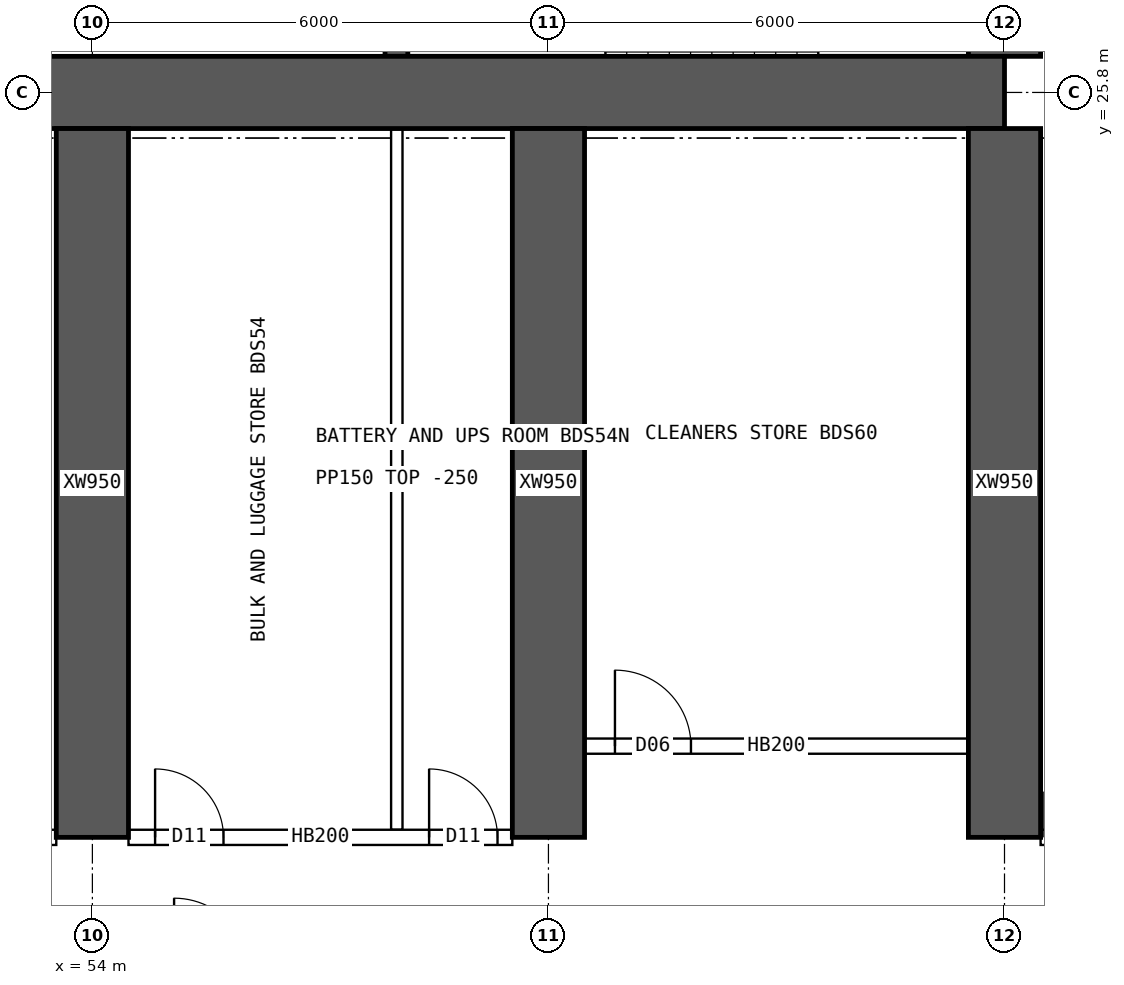
"""IFC4 building model, lengths in metres.
Left out: names, types, materials, properties, quantities, classifications, styles, units other than length and angle.
Written with IfcOpenShell. Run it as: python <this file> out.ifc"""

import sys

from ifc_helpers import new_model, si_unit, direction, frame, frame_2d, origin, place, context, subcontext, project, spatial, rectangle, extrude, element, fill, save


model = new_model("IFC4")
c1 = context("Model", 3, precision=1e-05, world=origin(), true_north=direction((0.0, 1.0)))
c2 = subcontext(c1, "Body", "Model", "MODEL_VIEW")
j1 = project(units=[si_unit("LENGTHUNIT", "METRE"), si_unit("PLANEANGLEUNIT", "RADIAN")], contexts=[c1])
p1 = place(None, origin())
s1 = spatial("IfcSite", under=j1, at=p1, CompositionType="ELEMENT")
p2 = place(p1, origin())
s2 = spatial("IfcBuilding", under=s1, at=p2, CompositionType="ELEMENT")
p3 = place(p2, frame((0.0, 0.0, 106.9)))
s3 = spatial("IfcBuildingStorey", under=s2, at=p3, CompositionType="ELEMENT", Elevation=106.9)
p4 = place(p3, frame((18.0, 25.8, 0.0), z_axis=(0.0, 0.0, 1.0), x_axis=(1.0, 0.0, 0.0)))
e1 = element("IfcWall", 1, at=p4, inside=s3, PredefinedType="SHEAR", context=c2, shape_type="SweptSolid", body=[
    extrude(rectangle(XDim=48.0, YDim=0.95, at=frame_2d((24.0, 0.0))), origin(), (0.0, 0.0, 1.0), 3.75),
])
p5 = place(p3, frame((66.0, 26.275, 0.0), z_axis=(0.0, 0.0, 1.0), x_axis=(0.0, 1.0, 0.0)))
e2 = element("IfcWall", 2, at=p5, inside=s3, PredefinedType="SHEAR", context=c2, shape_type="SweptSolid", body=[
    extrude(rectangle(XDim=11.45, YDim=0.95, at=frame_2d((5.725, 0.0))), origin(), (0.0, 0.0, 1.0), 3.75),
])
p6 = place(p5, frame((5.025, 0.0, 0.0)))
e3 = element("IfcOpeningElement", 3, at=p6, cuts=e2, PredefinedType="OPENING", context=c2, shape_type="SweptSolid", body=[
    extrude(rectangle(XDim=1.2, YDim=2.1, at=frame_2d((0.6, 1.05))), frame((0.0, 0.485, 0.0), z_axis=(0.0, -1.0, 0.0), x_axis=(1.0, 0.0, 0.0)), (0.0, 0.0, 1.0), 0.97),
])
p7 = place(p3, frame((58.0, 26.275, 0.0), z_axis=(0.0, 0.0, 1.0), x_axis=(0.0, 1.0, 0.0)))
e4 = element("IfcWall", 4, at=p7, inside=s3, PredefinedType="SHEAR", context=c2, shape_type="SweptSolid", body=[
    extrude(rectangle(XDim=3.975, YDim=0.3, at=frame_2d((1.988, 0.0))), origin(), (0.0, 0.0, 1.0), 3.75),
])
for number, where, z_axis, x_axis in (
    (5, (54.0, 16.0, 0.0), (0.0, 0.0, 1.0), (0.0, 1.0, 0.0)),
    (6, (60.0, 16.0, 0.0), (0.0, 0.0, 1.0), (0.0, 1.0, 0.0)),
    (7, (66.0, 16.0, 0.0), (0.0, 0.0, 1.0), (0.0, 1.0, 0.0)),
):
    element("IfcWall", number, at=place(p3, frame(where, z_axis=z_axis, x_axis=x_axis)), inside=s3, PredefinedType="SHEAR", context=c2, shape_type="SweptSolid", body=[
        extrude(rectangle(XDim=9.325, YDim=0.95, at=frame_2d((4.663, 0.0))), origin(), (0.0, 0.0, 1.0), 3.75),
    ])
p8 = place(p3, frame((48.475, 16.0, 0.0), z_axis=(0.0, 0.0, 1.0), x_axis=(1.0, 0.0, 0.0)))
e8 = element("IfcWall", 8, at=p8, inside=s3, PredefinedType="SOLIDWALL", context=c2, shape_type="SweptSolid", body=[
    extrude(rectangle(XDim=5.05, YDim=0.2, at=frame_2d((2.525, 0.0))), origin(), (0.0, 0.0, 1.0), 3.5),
])
p9 = place(p8, frame((0.15, 0.0, 0.0)))
e9 = element("IfcOpeningElement", 9, at=p9, cuts=e8, PredefinedType="OPENING", context=c2, shape_type="SweptSolid", body=[
    extrude(rectangle(XDim=0.9, YDim=2.1, at=frame_2d((0.45, 1.05))), frame((0.0, 0.11, 0.0), z_axis=(0.0, -1.0, 0.0), x_axis=(1.0, 0.0, 0.0)), (0.0, 0.0, 1.0), 0.22),
])
p10 = place(p8, frame((2.115, 0.0, 0.0)))
e10 = element("IfcOpeningElement", 10, at=p10, cuts=e8, PredefinedType="OPENING", context=c2, shape_type="SweptSolid", body=[
    extrude(rectangle(XDim=0.9, YDim=2.1, at=frame_2d((0.45, 1.05))), frame((0.0, 0.11, 0.0), z_axis=(0.0, -1.0, 0.0), x_axis=(1.0, 0.0, 0.0)), (0.0, 0.0, 1.0), 0.22),
])
p11 = place(p3, frame((54.475, 16.0, 0.0), z_axis=(0.0, 0.0, 1.0), x_axis=(1.0, 0.0, 0.0)))
e11 = element("IfcWall", 11, at=p11, inside=s3, PredefinedType="SOLIDWALL", context=c2, shape_type="SweptSolid", body=[
    extrude(rectangle(XDim=5.05, YDim=0.2, at=frame_2d((2.525, 0.0))), origin(), (0.0, 0.0, 1.0), 3.5),
])
p12 = place(p11, frame((0.35, 0.0, 0.0)))
e12 = element("IfcOpeningElement", 12, at=p12, cuts=e11, PredefinedType="OPENING", context=c2, shape_type="SweptSolid", body=[
    extrude(rectangle(XDim=0.9, YDim=2.1, at=frame_2d((0.45, 1.05))), frame((0.0, 0.11, 0.0), z_axis=(0.0, -1.0, 0.0), x_axis=(1.0, 0.0, 0.0)), (0.0, 0.0, 1.0), 0.22),
])
p13 = place(p11, frame((3.955, 0.0, 0.0)))
e13 = element("IfcOpeningElement", 13, at=p13, cuts=e11, PredefinedType="OPENING", context=c2, shape_type="SweptSolid", body=[
    extrude(rectangle(XDim=0.9, YDim=2.1, at=frame_2d((0.45, 1.05))), frame((0.0, 0.11, 0.0), z_axis=(0.0, -1.0, 0.0), x_axis=(1.0, 0.0, 0.0)), (0.0, 0.0, 1.0), 0.22),
])
p14 = place(p3, frame((66.475, 16.0, 0.0), z_axis=(0.0, 0.0, 1.0), x_axis=(1.0, 0.0, 0.0)))
e14 = element("IfcWall", 14, at=p14, inside=s3, PredefinedType="SOLIDWALL", context=c2, shape_type="SweptSolid", body=[
    extrude(rectangle(XDim=1.925, YDim=0.2, at=frame_2d((0.962, 0.0))), origin(), (0.0, 0.0, 1.0), 3.5),
])
p15 = place(p14, frame((0.05, 0.0, 0.0)))
e15 = element("IfcOpeningElement", 15, at=p15, cuts=e14, PredefinedType="OPENING", context=c2, shape_type="SweptSolid", body=[
    extrude(rectangle(XDim=1.2, YDim=2.1, at=frame_2d((0.6, 1.05))), frame((0.0, 0.11, 0.0), z_axis=(0.0, -1.0, 0.0), x_axis=(1.0, 0.0, 0.0)), (0.0, 0.0, 1.0), 0.22),
])
p16 = place(p3, frame((58.005, 16.1, 0.0), z_axis=(0.0, 0.0, 1.0), x_axis=(0.0, 1.0, 0.0)))
e16 = element("IfcWall", 16, at=p16, inside=s3, PredefinedType="PARTITIONING", context=c2, shape_type="SweptSolid", body=[
    extrude(rectangle(XDim=9.225, YDim=0.15, at=frame_2d((4.612, 0.0))), origin(), (0.0, 0.0, 1.0), 3.5),
])
p17 = place(p3, frame((60.475, 17.2, 0.0), z_axis=(0.0, 0.0, 1.0), x_axis=(1.0, 0.0, 0.0)))
e17 = element("IfcWall", 17, at=p17, inside=s3, PredefinedType="SOLIDWALL", context=c2, shape_type="SweptSolid", body=[
    extrude(rectangle(XDim=5.05, YDim=0.2, at=frame_2d((2.525, 0.0))), origin(), (0.0, 0.0, 1.0), 3.5),
])
p18 = place(p17, frame((0.4, 0.0, 0.0)))
e18 = element("IfcOpeningElement", 18, at=p18, cuts=e17, PredefinedType="OPENING", context=c2, shape_type="SweptSolid", body=[
    extrude(rectangle(XDim=1.0, YDim=2.1, at=frame_2d((0.5, 1.05))), frame((0.0, 0.11, 0.0), z_axis=(0.0, -1.0, 0.0), x_axis=(1.0, 0.0, 0.0)), (0.0, 0.0, 1.0), 0.22),
])
p19 = place(p12, origin())
e19 = element("IfcDoor", 19, at=p19, inside=s3, OperationType="SINGLE_SWING_LEFT", PredefinedType="DOOR", context=c2, shape_type="SweptSolid", body=[
    extrude(rectangle(XDim=0.9, YDim=2.1, at=frame_2d((0.45, 1.05))), frame((0.0, 0.025, 0.0), z_axis=(0.0, -1.0, 0.0), x_axis=(1.0, 0.0, 0.0)), (0.0, 0.0, 1.0), 0.05),
])
fill(e12, e19)
p20 = place(p13, origin())
e20 = element("IfcDoor", 20, at=p20, inside=s3, OperationType="SINGLE_SWING_LEFT", PredefinedType="DOOR", context=c2, shape_type="SweptSolid", body=[
    extrude(rectangle(XDim=0.9, YDim=2.1, at=frame_2d((0.45, 1.05))), frame((0.0, 0.025, 0.0), z_axis=(0.0, -1.0, 0.0), x_axis=(1.0, 0.0, 0.0)), (0.0, 0.0, 1.0), 0.05),
])
fill(e13, e20)
p21 = place(p18, origin())
e21 = element("IfcDoor", 21, at=p21, inside=s3, OperationType="SINGLE_SWING_LEFT", PredefinedType="DOOR", context=c2, shape_type="SweptSolid", body=[
    extrude(rectangle(XDim=1.0, YDim=2.1, at=frame_2d((0.5, 1.05))), frame((0.0, 0.025, 0.0), z_axis=(0.0, -1.0, 0.0), x_axis=(1.0, 0.0, 0.0)), (0.0, 0.0, 1.0), 0.05),
])
fill(e18, e21)
save(model, sys.argv[1])
